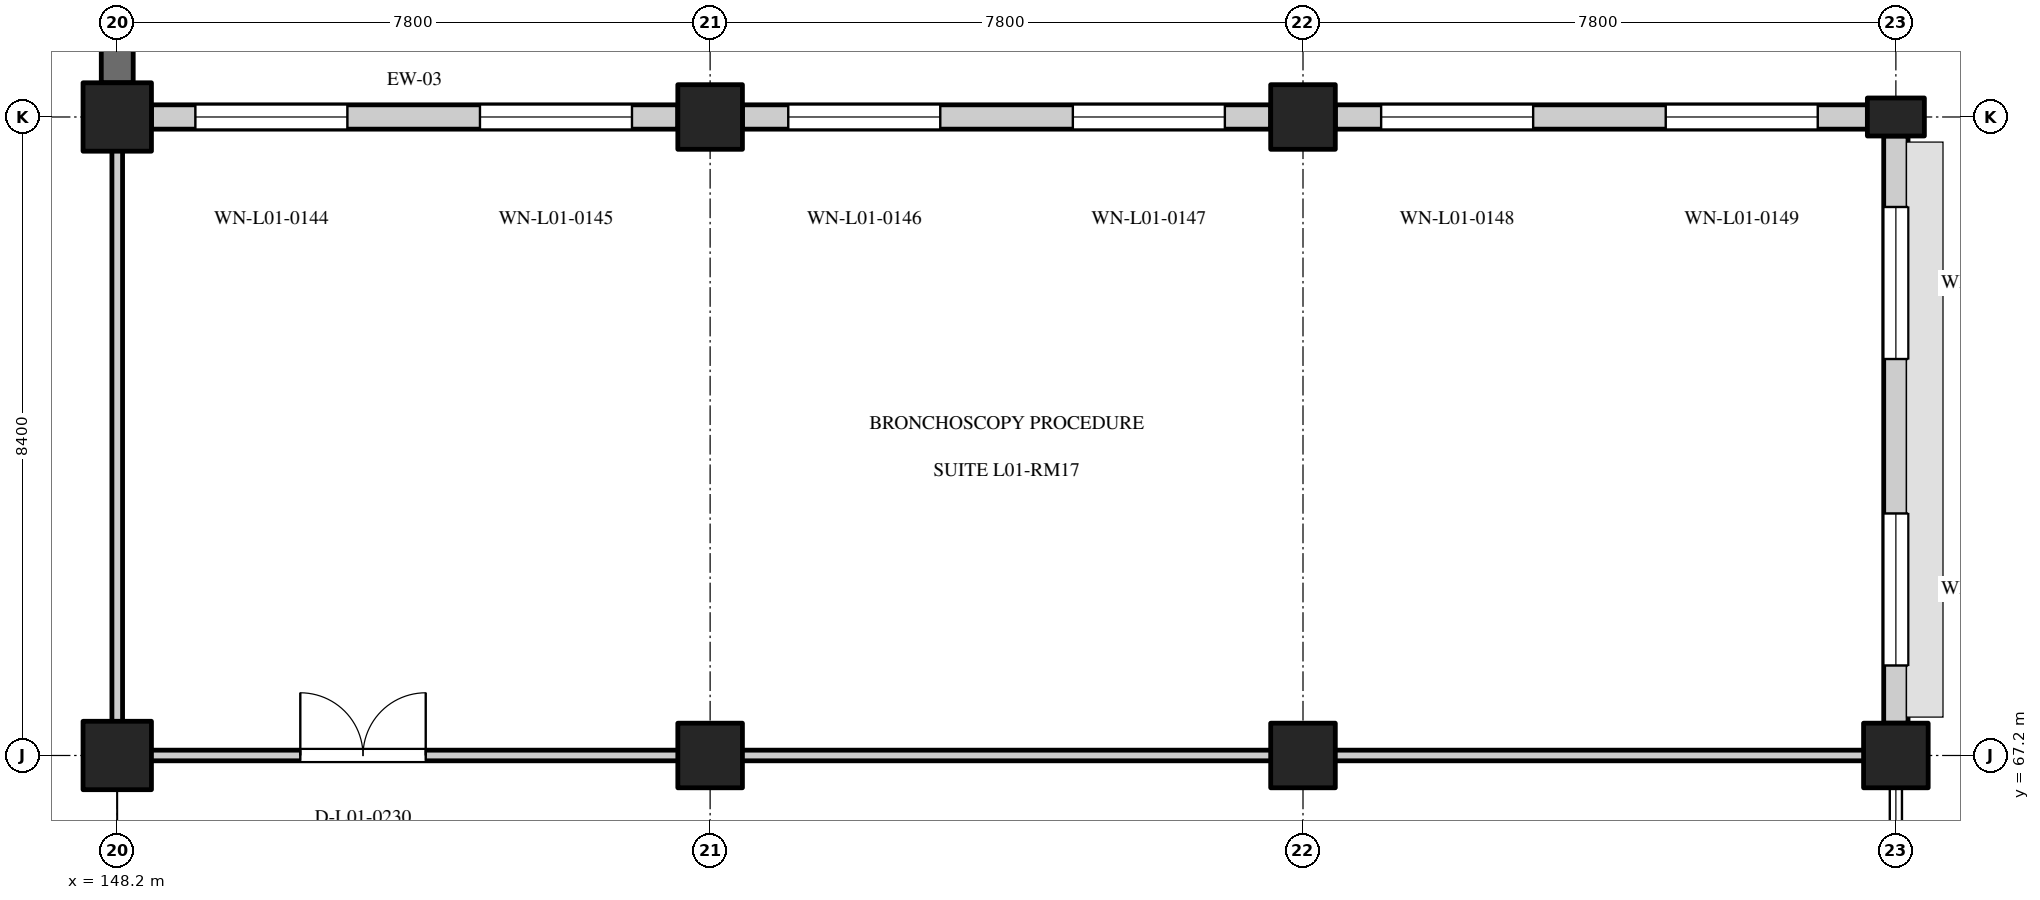
"""IFC4 building model, lengths in metres.
Left out: names, types, materials, properties, quantities, classifications, styles, units other than length and angle.
Written with IfcOpenShell. Run it as: python <this file> out.ifc"""

import sys

from ifc_helpers import new_model, si_unit, direction, frame, frame_2d, origin, origin_2d, place, context, subcontext, project, spatial, rectangle, extrude, element, fill, save


model = new_model("IFC4")
c1 = context("Model", 3, precision=1e-05, world=origin(), true_north=direction((0.0, 1.0)))
c2 = subcontext(c1, "Body", "Model", "MODEL_VIEW")
j1 = project(units=[si_unit("LENGTHUNIT", "METRE"), si_unit("PLANEANGLEUNIT", "RADIAN")], contexts=[c1])
p1 = place(None, origin())
s1 = spatial("IfcSite", under=j1, at=p1, CompositionType="ELEMENT")
p2 = place(p1, origin())
s2 = spatial("IfcBuilding", under=s1, at=p2, CompositionType="ELEMENT")
p3 = place(p2, frame((0.0, 0.0, 4.8)))
s3 = spatial("IfcBuildingStorey", under=s2, at=p3, CompositionType="ELEMENT", Elevation=4.8)
for number, where, z_axis, x_axis in (
    (1, (148.2, 67.2, 0.0), (0.0, 0.0, 1.0), (1.0, 0.0, 0.0)),
    (2, (148.2, 75.6, 0.0), (0.0, 0.0, 1.0), (1.0, 0.0, 0.0)),
):
    element("IfcColumn", number, at=place(p3, frame(where, z_axis=z_axis, x_axis=x_axis)), inside=s3, PredefinedType="COLUMN", context=c2, shape_type="SweptSolid", body=[
        extrude(rectangle(XDim=0.9, YDim=0.9, at=origin_2d()), origin(), (0.0, 0.0, 1.0), 4.8),
    ])
for number, where, z_axis, x_axis in (
    (3, (156.0, 67.2, 0.0), (0.0, 0.0, 1.0), (1.0, 0.0, 0.0)),
    (4, (156.0, 75.6, 0.0), (0.0, 0.0, 1.0), (1.0, 0.0, 0.0)),
    (5, (163.8, 67.2, 0.0), (0.0, 0.0, 1.0), (1.0, 0.0, 0.0)),
    (6, (163.8, 75.6, 0.0), (0.0, 0.0, 1.0), (1.0, 0.0, 0.0)),
    (7, (171.6, 67.2, 0.0), (0.0, 0.0, 1.0), (1.0, 0.0, 0.0)),
):
    element("IfcColumn", number, at=place(p3, frame(where, z_axis=z_axis, x_axis=x_axis)), inside=s3, PredefinedType="COLUMN", context=c2, shape_type="SweptSolid", body=[
        extrude(rectangle(XDim=0.85, YDim=0.85, at=origin_2d()), origin(), (0.0, 0.0, 1.0), 4.8),
    ])
p4 = place(p3, frame((171.6, 75.6, 0.0), z_axis=(0.0, 0.0, 1.0), x_axis=(0.0, 1.0, 0.0)))
e8 = element("IfcColumn", 8, at=p4, inside=s3, PredefinedType="PILASTER", context=c2, shape_type="SweptSolid", body=[
    extrude(rectangle(XDim=0.5, YDim=0.75, at=origin_2d()), origin(), (0.0, 0.0, 1.0), 4.8),
])
p5 = place(p3, frame((148.65, 75.6, 0.0), z_axis=(0.0, 0.0, 1.0), x_axis=(1.0, 0.0, 0.0)))
e9 = element("IfcWall", 9, at=p5, inside=s3, PredefinedType="STANDARD", context=c2, shape_type="SweptSolid", body=[
    extrude(rectangle(XDim=6.925, YDim=0.32, at=frame_2d((3.462, 0.0))), origin(), (0.0, 0.0, 1.0), 3.75),
])
p6 = place(p5, frame((0.578, 0.0, 0.75)))
e10 = element("IfcOpeningElement", 10, at=p6, cuts=e9, PredefinedType="OPENING", context=c2, shape_type="SweptSolid", body=[
    extrude(rectangle(XDim=2.0, YDim=1.65, at=frame_2d((1.0, 0.825))), frame((0.0, 0.172, 0.0), z_axis=(0.0, -1.0, 0.0), x_axis=(1.0, 0.0, 0.0)), (0.0, 0.0, 1.0), 0.344),
])
p7 = place(p5, frame((4.322, 0.0, 0.75)))
e11 = element("IfcOpeningElement", 11, at=p7, cuts=e9, PredefinedType="OPENING", context=c2, shape_type="SweptSolid", body=[
    extrude(rectangle(XDim=2.0, YDim=1.65, at=frame_2d((1.0, 0.825))), frame((0.0, 0.172, 0.0), z_axis=(0.0, -1.0, 0.0), x_axis=(1.0, 0.0, 0.0)), (0.0, 0.0, 1.0), 0.344),
])
p8 = place(p3, frame((156.425, 75.6, 0.0), z_axis=(0.0, 0.0, 1.0), x_axis=(1.0, 0.0, 0.0)))
e12 = element("IfcWall", 12, at=p8, inside=s3, PredefinedType="STANDARD", context=c2, shape_type="SweptSolid", body=[
    extrude(rectangle(XDim=6.95, YDim=0.32, at=frame_2d((3.475, 0.0))), origin(), (0.0, 0.0, 1.0), 3.75),
])
p9 = place(p8, frame((0.603, 0.0, 0.75)))
e13 = element("IfcOpeningElement", 13, at=p9, cuts=e12, PredefinedType="OPENING", context=c2, shape_type="SweptSolid", body=[
    extrude(rectangle(XDim=2.0, YDim=1.55, at=frame_2d((1.0, 0.775))), frame((0.0, 0.172, 0.0), z_axis=(0.0, -1.0, 0.0), x_axis=(1.0, 0.0, 0.0)), (0.0, 0.0, 1.0), 0.344),
])
p10 = place(p8, frame((4.347, 0.0, 0.75)))
e14 = element("IfcOpeningElement", 14, at=p10, cuts=e12, PredefinedType="OPENING", context=c2, shape_type="SweptSolid", body=[
    extrude(rectangle(XDim=2.0, YDim=1.55, at=frame_2d((1.0, 0.775))), frame((0.0, 0.172, 0.0), z_axis=(0.0, -1.0, 0.0), x_axis=(1.0, 0.0, 0.0)), (0.0, 0.0, 1.0), 0.344),
])
p11 = place(p3, frame((164.225, 75.6, 0.0), z_axis=(0.0, 0.0, 1.0), x_axis=(1.0, 0.0, 0.0)))
e15 = element("IfcWall", 15, at=p11, inside=s3, PredefinedType="STANDARD", context=c2, shape_type="SweptSolid", body=[
    extrude(rectangle(XDim=7.0, YDim=0.32, at=frame_2d((3.5, 0.0))), origin(), (0.0, 0.0, 1.0), 3.75),
])
p12 = place(p11, frame((0.603, 0.0, 0.75)))
e16 = element("IfcOpeningElement", 16, at=p12, cuts=e15, PredefinedType="OPENING", context=c2, shape_type="SweptSolid", body=[
    extrude(rectangle(XDim=2.0, YDim=1.45, at=frame_2d((1.0, 0.725))), frame((0.0, 0.172, 0.0), z_axis=(0.0, -1.0, 0.0), x_axis=(1.0, 0.0, 0.0)), (0.0, 0.0, 1.0), 0.344),
])
p13 = place(p11, frame((4.347, 0.0, 0.75)))
e17 = element("IfcOpeningElement", 17, at=p13, cuts=e15, PredefinedType="OPENING", context=c2, shape_type="SweptSolid", body=[
    extrude(rectangle(XDim=2.0, YDim=1.45, at=frame_2d((1.0, 0.725))), frame((0.0, 0.172, 0.0), z_axis=(0.0, -1.0, 0.0), x_axis=(1.0, 0.0, 0.0)), (0.0, 0.0, 1.0), 0.344),
])
p14 = place(p3, frame((148.2, 76.05, 0.0), z_axis=(0.0, 0.0, 1.0), x_axis=(0.0, 1.0, 0.0)))
e18 = element("IfcWall", 18, at=p14, inside=s3, PredefinedType="SOLIDWALL", context=c2, shape_type="SweptSolid", body=[
    extrude(rectangle(XDim=7.5, YDim=0.42, at=frame_2d((3.75, 0.0))), origin(), (0.0, 0.0, 1.0), 3.75),
])
p15 = place(p14, frame((3.25, 0.0, 0.75)))
e19 = element("IfcOpeningElement", 19, at=p15, cuts=e18, PredefinedType="OPENING", context=c2, shape_type="SweptSolid", body=[
    extrude(rectangle(XDim=1.0, YDim=1.45, at=frame_2d((0.5, 0.725))), frame((0.0, 0.222, 0.0), z_axis=(0.0, -1.0, 0.0), x_axis=(1.0, 0.0, 0.0)), (0.0, 0.0, 1.0), 0.444),
])
p16 = place(p3, frame((171.6, 67.625, 0.0), z_axis=(0.0, 0.0, 1.0), x_axis=(0.0, 1.0, 0.0)))
e20 = element("IfcWall", 20, at=p16, inside=s3, PredefinedType="STANDARD", context=c2, shape_type="SweptSolid", body=[
    extrude(rectangle(XDim=7.725, YDim=0.32, at=frame_2d((3.863, 0.0))), origin(), (0.0, 0.0, 1.0), 3.75),
])
p17 = place(p16, frame((0.759, 0.0, 0.75)))
e21 = element("IfcOpeningElement", 21, at=p17, cuts=e20, PredefinedType="OPENING", context=c2, shape_type="SweptSolid", body=[
    extrude(rectangle(XDim=2.0, YDim=1.45, at=frame_2d((1.0, 0.725))), frame((0.0, 0.172, 0.0), z_axis=(0.0, -1.0, 0.0), x_axis=(1.0, 0.0, 0.0)), (0.0, 0.0, 1.0), 0.344),
])
p18 = place(p16, frame((4.791, 0.0, 0.75)))
e22 = element("IfcOpeningElement", 22, at=p18, cuts=e20, PredefinedType="OPENING", context=c2, shape_type="SweptSolid", body=[
    extrude(rectangle(XDim=2.0, YDim=1.45, at=frame_2d((1.0, 0.725))), frame((0.0, 0.172, 0.0), z_axis=(0.0, -1.0, 0.0), x_axis=(1.0, 0.0, 0.0)), (0.0, 0.0, 1.0), 0.344),
])
p19 = place(p3, frame((148.285, 67.2, 0.0), z_axis=(0.0, 0.0, 1.0), x_axis=(1.0, 0.0, 0.0)))
e23 = element("IfcWall", 23, at=p19, inside=s3, PredefinedType="PARTITIONING", context=c2, shape_type="SweptSolid", body=[
    extrude(rectangle(XDim=23.23, YDim=0.14, at=frame_2d((11.615, 0.0))), origin(), (0.0, 0.0, 1.0), 4.43),
])
p20 = place(p19, frame((2.323, 0.0, 0.0)))
e24 = element("IfcOpeningElement", 24, at=p20, cuts=e23, PredefinedType="OPENING", context=c2, shape_type="SweptSolid", body=[
    extrude(rectangle(XDim=1.65, YDim=2.25, at=frame_2d((0.825, 1.125))), frame((0.0, 0.082, 0.0), z_axis=(0.0, -1.0, 0.0), x_axis=(1.0, 0.0, 0.0)), (0.0, 0.0, 1.0), 0.164),
])
for number, where, z_axis, x_axis in (
    (25, (155.615, 75.6, 0.0), (0.0, 0.0, 1.0), (1.0, 0.0, 0.0)),
    (26, (163.415, 75.6, 0.0), (0.0, 0.0, 1.0), (1.0, 0.0, 0.0)),
):
    element("IfcWall", number, at=place(p3, frame(where, z_axis=z_axis, x_axis=x_axis)), inside=s3, PredefinedType="PARTITIONING", context=c2, shape_type="SweptSolid", body=[
        extrude(rectangle(XDim=0.77, YDim=0.14, at=frame_2d((0.385, 0.0))), origin(), (0.0, 0.0, 1.0), 3.7),
    ])
p21 = place(p3, frame((148.2, 67.285, 0.0), z_axis=(0.0, 0.0, 1.0), x_axis=(0.0, 1.0, 0.0)))
e27 = element("IfcWall", 27, at=p21, inside=s3, PredefinedType="PARTITIONING", context=c2, shape_type="SweptSolid", body=[
    extrude(rectangle(XDim=8.23, YDim=0.14, at=frame_2d((4.115, 0.0))), origin(), (0.0, 0.0, 1.0), 3.7),
])
p22 = place(p6, origin())
e28 = element("IfcWindow", 28, at=p22, inside=s3, PartitioningType="DOUBLE_PANEL_VERTICAL", PredefinedType="WINDOW", context=c2, shape_type="SweptSolid", body=[
    extrude(rectangle(XDim=2.0, YDim=1.65, at=frame_2d((1.0, 0.825))), frame((0.0, 0.03, 0.0), z_axis=(0.0, -1.0, 0.0), x_axis=(1.0, 0.0, 0.0)), (0.0, 0.0, 1.0), 0.06),
])
fill(e10, e28)
p23 = place(p7, origin())
e29 = element("IfcWindow", 29, at=p23, inside=s3, PartitioningType="DOUBLE_PANEL_VERTICAL", PredefinedType="WINDOW", context=c2, shape_type="SweptSolid", body=[
    extrude(rectangle(XDim=2.0, YDim=1.65, at=frame_2d((1.0, 0.825))), frame((0.0, 0.03, 0.0), z_axis=(0.0, -1.0, 0.0), x_axis=(1.0, 0.0, 0.0)), (0.0, 0.0, 1.0), 0.06),
])
fill(e11, e29)
p24 = place(p9, origin())
e30 = element("IfcWindow", 30, at=p24, inside=s3, PartitioningType="DOUBLE_PANEL_VERTICAL", PredefinedType="WINDOW", context=c2, shape_type="SweptSolid", body=[
    extrude(rectangle(XDim=2.0, YDim=1.55, at=frame_2d((1.0, 0.775))), frame((0.0, 0.03, 0.0), z_axis=(0.0, -1.0, 0.0), x_axis=(1.0, 0.0, 0.0)), (0.0, 0.0, 1.0), 0.06),
])
fill(e13, e30)
p25 = place(p10, origin())
e31 = element("IfcWindow", 31, at=p25, inside=s3, PartitioningType="DOUBLE_PANEL_VERTICAL", PredefinedType="WINDOW", context=c2, shape_type="SweptSolid", body=[
    extrude(rectangle(XDim=2.0, YDim=1.55, at=frame_2d((1.0, 0.775))), frame((0.0, 0.03, 0.0), z_axis=(0.0, -1.0, 0.0), x_axis=(1.0, 0.0, 0.0)), (0.0, 0.0, 1.0), 0.06),
])
fill(e14, e31)
p26 = place(p12, origin())
e32 = element("IfcWindow", 32, at=p26, inside=s3, PartitioningType="DOUBLE_PANEL_VERTICAL", PredefinedType="WINDOW", context=c2, shape_type="SweptSolid", body=[
    extrude(rectangle(XDim=2.0, YDim=1.45, at=frame_2d((1.0, 0.725))), frame((0.0, 0.03, 0.0), z_axis=(0.0, -1.0, 0.0), x_axis=(1.0, 0.0, 0.0)), (0.0, 0.0, 1.0), 0.06),
])
fill(e16, e32)
p27 = place(p13, origin())
e33 = element("IfcWindow", 33, at=p27, inside=s3, PartitioningType="DOUBLE_PANEL_VERTICAL", PredefinedType="WINDOW", context=c2, shape_type="SweptSolid", body=[
    extrude(rectangle(XDim=2.0, YDim=1.45, at=frame_2d((1.0, 0.725))), frame((0.0, 0.03, 0.0), z_axis=(0.0, -1.0, 0.0), x_axis=(1.0, 0.0, 0.0)), (0.0, 0.0, 1.0), 0.06),
])
fill(e17, e33)
p28 = place(p17, origin())
e34 = element("IfcWindow", 34, at=p28, inside=s3, PartitioningType="DOUBLE_PANEL_VERTICAL", PredefinedType="WINDOW", context=c2, shape_type="SweptSolid", body=[
    extrude(rectangle(XDim=2.0, YDim=1.45, at=frame_2d((1.0, 0.725))), frame((0.0, 0.03, 0.0), z_axis=(0.0, -1.0, 0.0), x_axis=(1.0, 0.0, 0.0)), (0.0, 0.0, 1.0), 0.06),
])
fill(e21, e34)
p29 = place(p18, origin())
e35 = element("IfcWindow", 35, at=p29, inside=s3, PartitioningType="DOUBLE_PANEL_VERTICAL", PredefinedType="WINDOW", context=c2, shape_type="SweptSolid", body=[
    extrude(rectangle(XDim=2.0, YDim=1.45, at=frame_2d((1.0, 0.725))), frame((0.0, 0.03, 0.0), z_axis=(0.0, -1.0, 0.0), x_axis=(1.0, 0.0, 0.0)), (0.0, 0.0, 1.0), 0.06),
])
fill(e22, e35)
p30 = place(p20, origin())
e36 = element("IfcDoor", 36, at=p30, inside=s3, OperationType="DOUBLE_DOOR_SINGLE_SWING", PredefinedType="DOOR", context=c2, shape_type="SweptSolid", body=[
    extrude(rectangle(XDim=1.65, YDim=2.25, at=frame_2d((0.825, 1.125))), frame((0.0, 0.025, 0.0), z_axis=(0.0, -1.0, 0.0), x_axis=(1.0, 0.0, 0.0)), (0.0, 0.0, 1.0), 0.05),
])
fill(e24, e36)
save(model, sys.argv[1])
